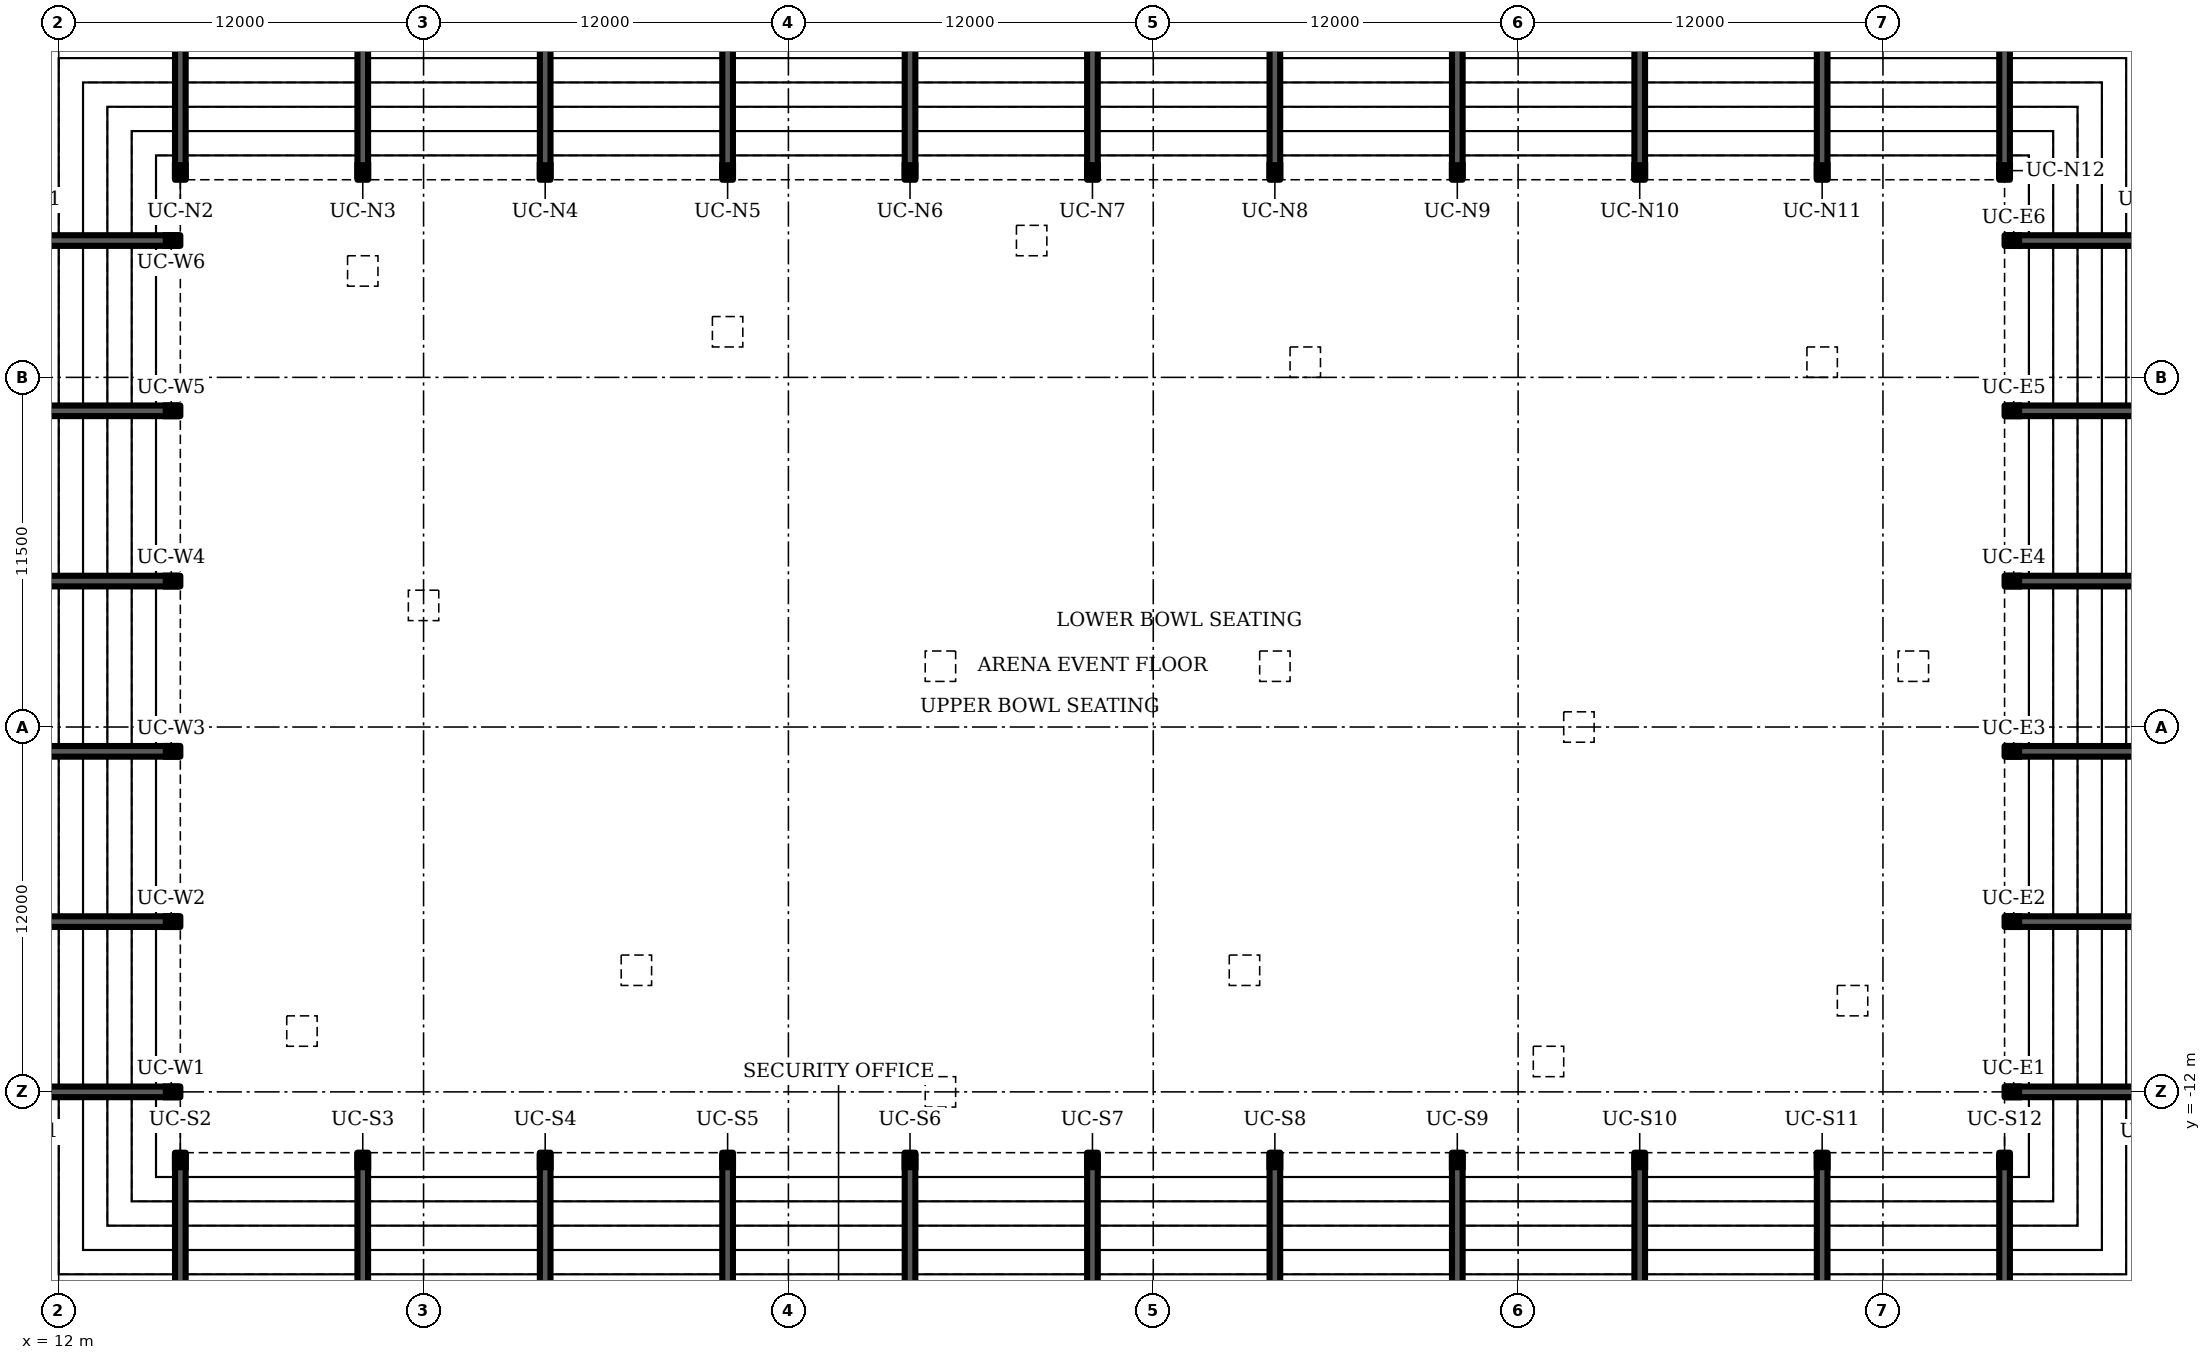
"""IFC4 building model, lengths in metres.
Left out: names, types, materials, properties, quantities, classifications, styles, units other than length and angle.
Written with IfcOpenShell. Run it as: python <this file> out.ifc"""

import sys

from ifc_helpers import new_model, si_unit, direction, frame, origin, origin_2d, place, context, subcontext, project, spatial, polyline, hollow_circle, outline, extrude, element, save


model = new_model("IFC4")
c1 = context("Model", 3, precision=1e-05, world=origin(), true_north=direction((0.0, 1.0)))
c2 = subcontext(c1, "Body", "Model", "MODEL_VIEW")
j1 = project(units=[si_unit("LENGTHUNIT", "METRE"), si_unit("PLANEANGLEUNIT", "RADIAN")], contexts=[c1])
p1 = place(None, origin())
s1 = spatial("IfcSite", under=j1, at=p1, CompositionType="ELEMENT")
p2 = place(p1, origin())
s2 = spatial("IfcBuilding", under=s1, at=p2, CompositionType="ELEMENT")
p3 = place(p2, origin())
s3 = spatial("IfcBuildingStorey", under=s2, at=p3, CompositionType="ELEMENT", Elevation=0.0)
for number, where, z_axis, x_axis in (
    (1, (16.0, -14.0, 0.0), (0.0, 0.0, 1.0), (0.0, -1.0, 0.0)),
    (2, (16.0, 18.0, 0.0), (0.0, 0.0, 1.0), (0.0, 1.0, 0.0)),
    (3, (22.0, -14.0, 0.0), (0.0, 0.0, 1.0), (0.0, -1.0, 0.0)),
    (4, (22.0, 18.0, 0.0), (0.0, 0.0, 1.0), (0.0, 1.0, 0.0)),
    (5, (28.0, -14.0, 0.0), (0.0, 0.0, 1.0), (0.0, -1.0, 0.0)),
    (6, (28.0, 18.0, 0.0), (0.0, 0.0, 1.0), (0.0, 1.0, 0.0)),
    (7, (34.0, -14.0, 0.0), (0.0, 0.0, 1.0), (0.0, -1.0, 0.0)),
    (8, (34.0, 18.0, 0.0), (0.0, 0.0, 1.0), (0.0, 1.0, 0.0)),
    (9, (40.0, -14.0, 0.0), (0.0, 0.0, 1.0), (0.0, -1.0, 0.0)),
    (10, (40.0, 18.0, 0.0), (0.0, 0.0, 1.0), (0.0, 1.0, 0.0)),
    (11, (46.0, -14.0, 0.0), (0.0, 0.0, 1.0), (0.0, -1.0, 0.0)),
    (12, (46.0, 18.0, 0.0), (0.0, 0.0, 1.0), (0.0, 1.0, 0.0)),
    (13, (52.0, -14.0, 0.0), (0.0, 0.0, 1.0), (0.0, -1.0, 0.0)),
    (14, (52.0, 18.0, 0.0), (0.0, 0.0, 1.0), (0.0, 1.0, 0.0)),
    (15, (58.0, -14.0, 0.0), (0.0, 0.0, 1.0), (0.0, -1.0, 0.0)),
    (16, (58.0, 18.0, 0.0), (0.0, 0.0, 1.0), (0.0, 1.0, 0.0)),
    (17, (64.0, -14.0, 0.0), (0.0, 0.0, 1.0), (0.0, -1.0, 0.0)),
    (18, (64.0, 18.0, 0.0), (0.0, 0.0, 1.0), (0.0, 1.0, 0.0)),
    (19, (70.0, -14.0, 0.0), (0.0, 0.0, 1.0), (0.0, -1.0, 0.0)),
    (20, (70.0, 18.0, 0.0), (0.0, 0.0, 1.0), (0.0, 1.0, 0.0)),
    (21, (76.0, -14.0, 0.0), (0.0, 0.0, 1.0), (0.0, -1.0, 0.0)),
    (22, (76.0, 18.0, 0.0), (0.0, 0.0, 1.0), (0.0, 1.0, 0.0)),
    (23, (16.0, -12.0, 0.0), (0.0, 0.0, 1.0), (-1.0, 0.0, 0.0)),
    (24, (76.0, -12.0, 0.0), (0.0, 0.0, 1.0), (1.0, 0.0, 0.0)),
    (25, (16.0, -6.4, 0.0), (0.0, 0.0, 1.0), (-1.0, 0.0, 0.0)),
    (26, (76.0, -6.4, 0.0), (0.0, 0.0, 1.0), (1.0, 0.0, 0.0)),
    (27, (16.0, -0.8, 0.0), (0.0, 0.0, 1.0), (-1.0, 0.0, 0.0)),
    (28, (76.0, -0.8, 0.0), (0.0, 0.0, 1.0), (1.0, 0.0, 0.0)),
    (29, (16.0, 4.8, 0.0), (0.0, 0.0, 1.0), (-1.0, 0.0, 0.0)),
    (30, (76.0, 4.8, 0.0), (0.0, 0.0, 1.0), (1.0, 0.0, 0.0)),
    (31, (16.0, 10.4, 0.0), (0.0, 0.0, 1.0), (-1.0, 0.0, 0.0)),
    (32, (76.0, 10.4, 0.0), (0.0, 0.0, 1.0), (1.0, 0.0, 0.0)),
    (33, (16.0, 16.0, 0.0), (0.0, 0.0, 1.0), (-1.0, 0.0, 0.0)),
    (34, (76.0, 16.0, 0.0), (0.0, 0.0, 1.0), (1.0, 0.0, 0.0)),
):
    element("IfcWall", number, at=place(p3, frame(where, z_axis=z_axis, x_axis=x_axis)), inside=s3, PredefinedType="SHEAR", context=c2, shape_type="SweptSolid", body=[
        extrude(outline(polyline([(0.0, 0.0), (7.2, 0.0), (7.2, 4.7), (6.4, 4.7), (6.4, 4.15), (5.6, 4.15), (5.6, 3.6), (4.8, 3.6), (4.8, 3.05), (4.0, 3.05), (4.0, 2.5), (3.2, 2.5), (3.2, 1.95), (2.4, 1.95), (2.4, 1.4), (1.6, 1.4), (1.6, 0.85), (0.8, 0.85), (0.8, 0.3), (0.0, 0.3), (0.0, 0.0)])), frame((0.0, 0.175, 0.0), z_axis=(0.0, -1.0, 0.0), x_axis=(1.0, 0.0, 0.0)), (0.0, 0.0, 1.0), 0.35),
    ])
for number, where, z_axis, x_axis in (
    (35, (16.0, -14.3, 0.3), (0.0, 0.0, 1.0), (1.0, 0.0, 0.0)),
    (36, (22.0, -14.3, 0.3), (0.0, 0.0, 1.0), (1.0, 0.0, 0.0)),
    (37, (28.0, -14.3, 0.3), (0.0, 0.0, 1.0), (1.0, 0.0, 0.0)),
    (38, (34.0, -14.3, 0.3), (0.0, 0.0, 1.0), (1.0, 0.0, 0.0)),
    (39, (40.0, -14.3, 0.3), (0.0, 0.0, 1.0), (1.0, 0.0, 0.0)),
    (40, (46.0, -14.3, 0.3), (0.0, 0.0, 1.0), (1.0, 0.0, 0.0)),
    (41, (52.0, -14.3, 0.3), (0.0, 0.0, 1.0), (1.0, 0.0, 0.0)),
    (42, (58.0, -14.3, 0.3), (0.0, 0.0, 1.0), (1.0, 0.0, 0.0)),
    (43, (64.0, -14.3, 0.3), (0.0, 0.0, 1.0), (1.0, 0.0, 0.0)),
    (44, (70.0, -14.3, 0.3), (0.0, 0.0, 1.0), (1.0, 0.0, 0.0)),
    (45, (76.0, -14.3, 0.3), (0.0, 0.0, 1.0), (1.0, 0.0, 0.0)),
    (46, (16.0, 18.3, 0.3), (0.0, 0.0, 1.0), (1.0, 0.0, 0.0)),
    (47, (22.0, 18.3, 0.3), (0.0, 0.0, 1.0), (1.0, 0.0, 0.0)),
    (48, (28.0, 18.3, 0.3), (0.0, 0.0, 1.0), (1.0, 0.0, 0.0)),
    (49, (34.0, 18.3, 0.3), (0.0, 0.0, 1.0), (1.0, 0.0, 0.0)),
    (50, (40.0, 18.3, 0.3), (0.0, 0.0, 1.0), (1.0, 0.0, 0.0)),
    (51, (46.0, 18.3, 0.3), (0.0, 0.0, 1.0), (1.0, 0.0, 0.0)),
    (52, (52.0, 18.3, 0.3), (0.0, 0.0, 1.0), (1.0, 0.0, 0.0)),
    (53, (58.0, 18.3, 0.3), (0.0, 0.0, 1.0), (1.0, 0.0, 0.0)),
    (54, (64.0, 18.3, 0.3), (0.0, 0.0, 1.0), (1.0, 0.0, 0.0)),
    (55, (70.0, 18.3, 0.3), (0.0, 0.0, 1.0), (1.0, 0.0, 0.0)),
    (56, (76.0, 18.3, 0.3), (0.0, 0.0, 1.0), (1.0, 0.0, 0.0)),
    (57, (15.7, -12.0, 0.3), (0.0, 0.0, 1.0), (1.0, 0.0, 0.0)),
    (58, (15.7, -6.4, 0.3), (0.0, 0.0, 1.0), (1.0, 0.0, 0.0)),
    (59, (15.7, -0.8, 0.3), (0.0, 0.0, 1.0), (1.0, 0.0, 0.0)),
    (60, (15.7, 4.8, 0.3), (0.0, 0.0, 1.0), (1.0, 0.0, 0.0)),
    (61, (15.7, 10.4, 0.3), (0.0, 0.0, 1.0), (1.0, 0.0, 0.0)),
    (62, (15.7, 16.0, 0.3), (0.0, 0.0, 1.0), (1.0, 0.0, 0.0)),
    (63, (76.3, -12.0, 0.3), (0.0, 0.0, 1.0), (1.0, 0.0, 0.0)),
    (64, (76.3, -6.4, 0.3), (0.0, 0.0, 1.0), (1.0, 0.0, 0.0)),
    (65, (76.3, -0.8, 0.3), (0.0, 0.0, 1.0), (1.0, 0.0, 0.0)),
    (66, (76.3, 4.8, 0.3), (0.0, 0.0, 1.0), (1.0, 0.0, 0.0)),
    (67, (76.3, 10.4, 0.3), (0.0, 0.0, 1.0), (1.0, 0.0, 0.0)),
    (68, (76.3, 16.0, 0.3), (0.0, 0.0, 1.0), (1.0, 0.0, 0.0)),
):
    element("IfcColumn", number, at=place(p3, frame(where, z_axis=z_axis, x_axis=x_axis)), inside=s3, PredefinedType="COLUMN", context=c2, shape_type="SweptSolid", body=[
        extrude(hollow_circle(Radius=0.178, WallThickness=0.016, at=origin_2d()), origin(), (0.0, 0.0, 1.0), 7.7),
    ])
save(model, sys.argv[1])
